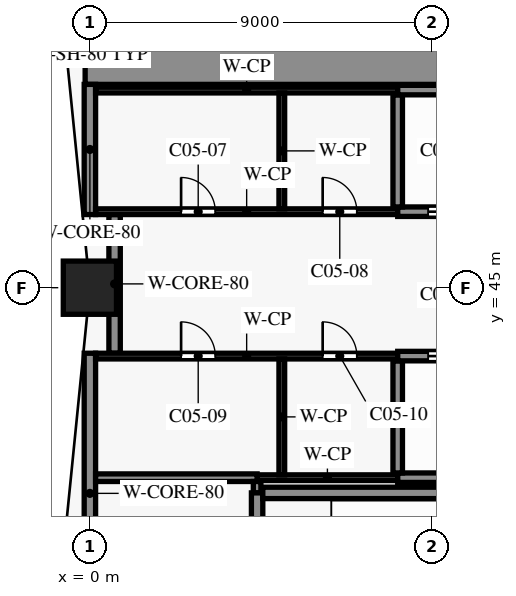
"""IFC4 building model, lengths in metres.
Left out: names, types, materials, properties, quantities, classifications, styles, units other than length and angle.
Written with IfcOpenShell. Run it as: python <this file> out.ifc"""

import sys

from ifc_helpers import new_model, si_unit, direction, frame, frame_2d, origin, origin_2d, place, context, subcontext, project, spatial, rectangle, extrude, element, fill, save


model = new_model("IFC4")
c1 = context("Model", 3, precision=1e-05, world=origin(), true_north=direction((0.0, 1.0)))
c2 = subcontext(c1, "Body", "Model", "MODEL_VIEW")
j1 = project(units=[si_unit("LENGTHUNIT", "METRE"), si_unit("PLANEANGLEUNIT", "RADIAN")], contexts=[c1])
p1 = place(None, origin())
s1 = spatial("IfcSite", under=j1, at=p1, CompositionType="ELEMENT")
p2 = place(p1, origin())
s2 = spatial("IfcBuilding", under=s1, at=p2, CompositionType="ELEMENT")
p3 = place(p2, frame((0.0, 0.0, 19.5)))
s3 = spatial("IfcBuildingStorey", under=s2, at=p3, CompositionType="ELEMENT", Elevation=19.5)
p4 = place(p3, frame((0.0, 45.0, 0.0), z_axis=(0.0, 0.0, 1.0), x_axis=(1.0, 0.0, 0.0)))
e1 = element("IfcColumn", 1, at=p4, inside=s3, PredefinedType="COLUMN", context=c2, shape_type="SweptSolid", body=[
    extrude(rectangle(XDim=1.4, YDim=1.4, at=origin_2d()), origin(), (0.0, 0.0, 1.0), 8.0),
])
p5 = place(p3, frame((4.55, 39.6, 0.0), z_axis=(0.0, 0.0, 1.0), x_axis=(1.0, 0.0, 0.0)))
e2 = element("IfcWall", 2, at=p5, inside=s3, PredefinedType="SHEAR", context=c2, shape_type="SweptSolid", body=[
    extrude(rectangle(XDim=7.7, YDim=0.3, at=frame_2d((3.85, 0.0))), origin(), (0.0, 0.0, 1.0), 7.7),
])
p6 = place(p3, frame((4.4, 40.0, 0.0), z_axis=(0.0, 0.0, 1.0), x_axis=(1.0, 0.0, 0.0)))
e3 = element("IfcWall", 3, at=p6, inside=s3, PredefinedType="PARTITIONING", context=c2, shape_type="SweptSolid", body=[
    extrude(rectangle(XDim=3.7, YDim=0.15, at=frame_2d((1.85, 0.0))), origin(), (0.0, 0.0, 1.0), 7.7),
])
p7 = place(p3, frame((0.15, 40.0, 0.0), z_axis=(0.0, 0.0, 1.0), x_axis=(1.0, 0.0, 0.0)))
e4 = element("IfcWall", 4, at=p7, inside=s3, PredefinedType="PARTITIONING", context=c2, shape_type="SweptSolid", body=[
    extrude(rectangle(XDim=4.25, YDim=0.2, at=frame_2d((2.125, 0.0))), origin(), (0.0, 0.0, 1.0), 7.7),
])
p8 = place(p3, frame((8.1, 40.0, 0.0), z_axis=(0.0, 0.0, 1.0), x_axis=(1.0, 0.0, 0.0)))
e5 = element("IfcWall", 5, at=p8, inside=s3, PredefinedType="SHEAR", context=c2, shape_type="SweptSolid", body=[
    extrude(rectangle(XDim=16.075, YDim=0.25, at=frame_2d((8.038, 0.0))), origin(), (0.0, 0.0, 1.0), 7.7),
])
p9 = place(p3, frame((0.15, 43.2, 0.0), z_axis=(0.0, 0.0, 1.0), x_axis=(1.0, 0.0, 0.0)))
e6 = element("IfcWall", 6, at=p9, inside=s3, PredefinedType="PARTITIONING", context=c2, shape_type="SweptSolid", body=[
    extrude(rectangle(XDim=7.95, YDim=0.15, at=frame_2d((3.975, 0.0))), origin(), (0.0, 0.0, 1.0), 7.7),
])
p10 = place(p9, frame((2.25, 0.0, 0.0)))
e7 = element("IfcOpeningElement", 7, at=p10, cuts=e6, PredefinedType="OPENING", context=c2, shape_type="SweptSolid", body=[
    extrude(rectangle(XDim=0.9, YDim=2.1, at=frame_2d((0.45, 1.05))), frame((0.0, 0.085, 0.0), z_axis=(0.0, -1.0, 0.0), x_axis=(1.0, 0.0, 0.0)), (0.0, 0.0, 1.0), 0.17),
])
p11 = place(p9, frame((5.975, 0.0, 0.0)))
e8 = element("IfcOpeningElement", 8, at=p11, cuts=e6, PredefinedType="OPENING", context=c2, shape_type="SweptSolid", body=[
    extrude(rectangle(XDim=0.9, YDim=2.1, at=frame_2d((0.45, 1.05))), frame((0.0, 0.085, 0.0), z_axis=(0.0, -1.0, 0.0), x_axis=(1.0, 0.0, 0.0)), (0.0, 0.0, 1.0), 0.17),
])
p12 = place(p3, frame((8.1, 43.2, 0.0), z_axis=(0.0, 0.0, 1.0), x_axis=(1.0, 0.0, 0.0)))
e9 = element("IfcWall", 9, at=p12, inside=s3, PredefinedType="SHEAR", context=c2, shape_type="SweptSolid", body=[
    extrude(rectangle(XDim=16.075, YDim=0.25, at=frame_2d((8.038, 0.0))), origin(), (0.0, 0.0, 1.0), 7.7),
])
p13 = place(p12, frame((14.3, 0.0, 0.0)))
e10 = element("IfcOpeningElement", 10, at=p13, cuts=e9, PredefinedType="OPENING", context=c2, shape_type="SweptSolid", body=[
    extrude(rectangle(XDim=1.1, YDim=2.1, at=frame_2d((0.55, 1.05))), frame((0.0, 0.135, 0.0), z_axis=(0.0, -1.0, 0.0), x_axis=(1.0, 0.0, 0.0)), (0.0, 0.0, 1.0), 0.27),
])
p14 = place(p12, frame((0.8, 0.0, 0.0)))
e11 = element("IfcOpeningElement", 11, at=p14, cuts=e9, PredefinedType="OPENING", context=c2, shape_type="SweptSolid", body=[
    extrude(rectangle(XDim=1.1, YDim=2.1, at=frame_2d((0.55, 1.05))), frame((0.0, 0.135, 0.0), z_axis=(0.0, -1.0, 0.0), x_axis=(1.0, 0.0, 0.0)), (0.0, 0.0, 1.0), 0.27),
])
p15 = place(p12, frame((3.5, 0.0, 0.0)))
e12 = element("IfcOpeningElement", 12, at=p15, cuts=e9, PredefinedType="OPENING", context=c2, shape_type="SweptSolid", body=[
    extrude(rectangle(XDim=1.1, YDim=2.1, at=frame_2d((0.55, 1.05))), frame((0.0, 0.135, 0.0), z_axis=(0.0, -1.0, 0.0), x_axis=(1.0, 0.0, 0.0)), (0.0, 0.0, 1.0), 0.27),
])
p16 = place(p12, frame((6.2, 0.0, 0.0)))
e13 = element("IfcOpeningElement", 13, at=p16, cuts=e9, PredefinedType="OPENING", context=c2, shape_type="SweptSolid", body=[
    extrude(rectangle(XDim=1.1, YDim=2.1, at=frame_2d((0.55, 1.05))), frame((0.0, 0.135, 0.0), z_axis=(0.0, -1.0, 0.0), x_axis=(1.0, 0.0, 0.0)), (0.0, 0.0, 1.0), 0.27),
])
p17 = place(p12, frame((8.9, 0.0, 0.0)))
e14 = element("IfcOpeningElement", 14, at=p17, cuts=e9, PredefinedType="OPENING", context=c2, shape_type="SweptSolid", body=[
    extrude(rectangle(XDim=1.1, YDim=2.1, at=frame_2d((0.55, 1.05))), frame((0.0, 0.135, 0.0), z_axis=(0.0, -1.0, 0.0), x_axis=(1.0, 0.0, 0.0)), (0.0, 0.0, 1.0), 0.27),
])
p18 = place(p12, frame((11.6, 0.0, 0.0)))
e15 = element("IfcOpeningElement", 15, at=p18, cuts=e9, PredefinedType="OPENING", context=c2, shape_type="SweptSolid", body=[
    extrude(rectangle(XDim=1.1, YDim=2.1, at=frame_2d((0.55, 1.05))), frame((0.0, 0.135, 0.0), z_axis=(0.0, -1.0, 0.0), x_axis=(1.0, 0.0, 0.0)), (0.0, 0.0, 1.0), 0.27),
])
p19 = place(p3, frame((0.15, 47.0, 0.0), z_axis=(0.0, 0.0, 1.0), x_axis=(1.0, 0.0, 0.0)))
e16 = element("IfcWall", 16, at=p19, inside=s3, PredefinedType="PARTITIONING", context=c2, shape_type="SweptSolid", body=[
    extrude(rectangle(XDim=7.95, YDim=0.15, at=frame_2d((3.975, 0.0))), origin(), (0.0, 0.0, 1.0), 7.7),
])
p20 = place(p19, frame((2.25, 0.0, 0.0)))
e17 = element("IfcOpeningElement", 17, at=p20, cuts=e16, PredefinedType="OPENING", context=c2, shape_type="SweptSolid", body=[
    extrude(rectangle(XDim=0.9, YDim=2.1, at=frame_2d((0.45, 1.05))), frame((0.0, 0.085, 0.0), z_axis=(0.0, -1.0, 0.0), x_axis=(1.0, 0.0, 0.0)), (0.0, 0.0, 1.0), 0.17),
])
p21 = place(p19, frame((5.975, 0.0, 0.0)))
e18 = element("IfcOpeningElement", 18, at=p21, cuts=e16, PredefinedType="OPENING", context=c2, shape_type="SweptSolid", body=[
    extrude(rectangle(XDim=0.9, YDim=2.1, at=frame_2d((0.45, 1.05))), frame((0.0, 0.085, 0.0), z_axis=(0.0, -1.0, 0.0), x_axis=(1.0, 0.0, 0.0)), (0.0, 0.0, 1.0), 0.17),
])
p22 = place(p3, frame((8.1, 47.0, 0.0), z_axis=(0.0, 0.0, 1.0), x_axis=(1.0, 0.0, 0.0)))
e19 = element("IfcWall", 19, at=p22, inside=s3, PredefinedType="SHEAR", context=c2, shape_type="SweptSolid", body=[
    extrude(rectangle(XDim=13.5, YDim=0.25, at=frame_2d((6.75, 0.0))), origin(), (0.0, 0.0, 1.0), 7.7),
])
p23 = place(p22, frame((0.8, 0.0, 0.0)))
e20 = element("IfcOpeningElement", 20, at=p23, cuts=e19, PredefinedType="OPENING", context=c2, shape_type="SweptSolid", body=[
    extrude(rectangle(XDim=1.1, YDim=2.1, at=frame_2d((0.55, 1.05))), frame((0.0, 0.135, 0.0), z_axis=(0.0, -1.0, 0.0), x_axis=(1.0, 0.0, 0.0)), (0.0, 0.0, 1.0), 0.27),
])
p24 = place(p22, frame((3.5, 0.0, 0.0)))
e21 = element("IfcOpeningElement", 21, at=p24, cuts=e19, PredefinedType="OPENING", context=c2, shape_type="SweptSolid", body=[
    extrude(rectangle(XDim=1.1, YDim=2.1, at=frame_2d((0.55, 1.05))), frame((0.0, 0.135, 0.0), z_axis=(0.0, -1.0, 0.0), x_axis=(1.0, 0.0, 0.0)), (0.0, 0.0, 1.0), 0.27),
])
p25 = place(p22, frame((6.2, 0.0, 0.0)))
e22 = element("IfcOpeningElement", 22, at=p25, cuts=e19, PredefinedType="OPENING", context=c2, shape_type="SweptSolid", body=[
    extrude(rectangle(XDim=1.1, YDim=2.1, at=frame_2d((0.55, 1.05))), frame((0.0, 0.135, 0.0), z_axis=(0.0, -1.0, 0.0), x_axis=(1.0, 0.0, 0.0)), (0.0, 0.0, 1.0), 0.27),
])
p26 = place(p22, frame((8.9, 0.0, 0.0)))
e23 = element("IfcOpeningElement", 23, at=p26, cuts=e19, PredefinedType="OPENING", context=c2, shape_type="SweptSolid", body=[
    extrude(rectangle(XDim=1.1, YDim=2.1, at=frame_2d((0.55, 1.05))), frame((0.0, 0.135, 0.0), z_axis=(0.0, -1.0, 0.0), x_axis=(1.0, 0.0, 0.0)), (0.0, 0.0, 1.0), 0.27),
])
p27 = place(p22, frame((11.6, 0.0, 0.0)))
e24 = element("IfcOpeningElement", 24, at=p27, cuts=e19, PredefinedType="OPENING", context=c2, shape_type="SweptSolid", body=[
    extrude(rectangle(XDim=1.1, YDim=2.1, at=frame_2d((0.55, 1.05))), frame((0.0, 0.135, 0.0), z_axis=(0.0, -1.0, 0.0), x_axis=(1.0, 0.0, 0.0)), (0.0, 0.0, 1.0), 0.27),
])
p28 = place(p3, frame((0.15, 50.2, 0.0), z_axis=(0.0, 0.0, 1.0), x_axis=(1.0, 0.0, 0.0)))
e25 = element("IfcWall", 25, at=p28, inside=s3, PredefinedType="PARTITIONING", context=c2, shape_type="SweptSolid", body=[
    extrude(rectangle(XDim=7.95, YDim=0.15, at=frame_2d((3.975, 0.0))), origin(), (0.0, 0.0, 1.0), 7.7),
])
p29 = place(p3, frame((8.1, 50.2, 0.0), z_axis=(0.0, 0.0, 1.0), x_axis=(1.0, 0.0, 0.0)))
e26 = element("IfcWall", 26, at=p29, inside=s3, PredefinedType="SHEAR", context=c2, shape_type="SweptSolid", body=[
    extrude(rectangle(XDim=13.375, YDim=0.25, at=frame_2d((6.688, 0.0))), origin(), (0.0, 0.0, 1.0), 7.7),
])
p30 = place(p3, frame((-0.125, 51.0, 0.0), z_axis=(0.0, 0.0, 1.0), x_axis=(1.0, 0.0, 0.0)))
e27 = element("IfcWall", 27, at=p30, inside=s3, PredefinedType="SHEAR", context=c2, shape_type="SweptSolid", body=[
    extrude(rectangle(XDim=21.625, YDim=1.3, at=frame_2d((10.812, 0.0))), origin(), (0.0, 0.0, 1.0), 7.7),
])
p31 = place(p3, frame((0.0, 35.9, 0.0), z_axis=(0.0, 0.0, 1.0), x_axis=(0.0, 1.0, 0.0)))
e28 = element("IfcWall", 28, at=p31, inside=s3, PredefinedType="SHEAR", context=c2, shape_type="SweptSolid", body=[
    extrude(rectangle(XDim=7.375, YDim=0.3, at=frame_2d((3.688, 0.0))), origin(), (0.0, 0.0, 1.0), 7.7),
])
p32 = place(p3, frame((0.0, 46.925, 0.0), z_axis=(0.0, 0.0, 1.0), x_axis=(0.0, 1.0, 0.0)))
e29 = element("IfcWall", 29, at=p32, inside=s3, PredefinedType="SHEAR", context=c2, shape_type="SweptSolid", body=[
    extrude(rectangle(XDim=3.425, YDim=0.3, at=frame_2d((1.712, 0.0))), origin(), (0.0, 0.0, 1.0), 7.7),
])
p33 = place(p3, frame((0.65, 43.275, 0.0), z_axis=(0.0, 0.0, 1.0), x_axis=(0.0, 1.0, 0.0)))
e30 = element("IfcWall", 30, at=p33, inside=s3, PredefinedType="SHEAR", context=c2, shape_type="SweptSolid", body=[
    extrude(rectangle(XDim=3.65, YDim=0.3, at=frame_2d((1.825, 0.0))), origin(), (0.0, 0.0, 1.0), 7.7),
])
p34 = place(p3, frame((4.4, 39.6, 0.0), z_axis=(0.0, 0.0, 1.0), x_axis=(0.0, 1.0, 0.0)))
e31 = element("IfcWall", 31, at=p34, inside=s3, PredefinedType="PARTITIONING", context=c2, shape_type="SweptSolid", body=[
    extrude(rectangle(XDim=0.3, YDim=0.2, at=frame_2d((0.15, 0.0))), origin(), (0.0, 0.0, 1.0), 7.7),
])
p35 = place(p3, frame((4.4, 36.15, 0.0), z_axis=(0.0, 0.0, 1.0), x_axis=(0.0, 1.0, 0.0)))
e32 = element("IfcWall", 32, at=p35, inside=s3, PredefinedType="SHEAR", context=c2, shape_type="SweptSolid", body=[
    extrude(rectangle(XDim=3.45, YDim=0.3, at=frame_2d((1.725, 0.0))), origin(), (0.0, 0.0, 1.0), 7.7),
])
for number, where, z_axis, x_axis in (
    (33, (5.05, 40.075, 0.0), (0.0, 0.0, 1.0), (0.0, 1.0, 0.0)),
    (34, (5.05, 47.075, 0.0), (0.0, 0.0, 1.0), (0.0, 1.0, 0.0)),
):
    element("IfcWall", number, at=place(p3, frame(where, z_axis=z_axis, x_axis=x_axis)), inside=s3, PredefinedType="PARTITIONING", context=c2, shape_type="SweptSolid", body=[
        extrude(rectangle(XDim=3.05, YDim=0.15, at=frame_2d((1.525, 0.0))), origin(), (0.0, 0.0, 1.0), 7.7),
    ])
for number, where, z_axis, x_axis in (
    (35, (8.1, 40.125, 0.0), (0.0, 0.0, 1.0), (0.0, 1.0, 0.0)),
    (36, (8.1, 47.125, 0.0), (0.0, 0.0, 1.0), (0.0, 1.0, 0.0)),
):
    element("IfcWall", number, at=place(p3, frame(where, z_axis=z_axis, x_axis=x_axis)), inside=s3, PredefinedType="SHEAR", context=c2, shape_type="SweptSolid", body=[
        extrude(rectangle(XDim=2.95, YDim=0.25, at=frame_2d((1.475, 0.0))), origin(), (0.0, 0.0, 1.0), 7.7),
    ])
p36 = place(p20, origin())
e37 = element("IfcDoor", 37, at=p36, inside=s3, OperationType="SINGLE_SWING_RIGHT", PredefinedType="DOOR", context=c2, shape_type="SweptSolid", body=[
    extrude(rectangle(XDim=0.9, YDim=2.1, at=frame_2d((0.45, 1.05))), frame((0.0, 0.025, 0.0), z_axis=(0.0, -1.0, 0.0), x_axis=(1.0, 0.0, 0.0)), (0.0, 0.0, 1.0), 0.05),
])
fill(e17, e37)
p37 = place(p21, origin())
e38 = element("IfcDoor", 38, at=p37, inside=s3, OperationType="SINGLE_SWING_LEFT", PredefinedType="DOOR", context=c2, shape_type="SweptSolid", body=[
    extrude(rectangle(XDim=0.9, YDim=2.1, at=frame_2d((0.45, 1.05))), frame((0.0, 0.025, 0.0), z_axis=(0.0, -1.0, 0.0), x_axis=(1.0, 0.0, 0.0)), (0.0, 0.0, 1.0), 0.05),
])
fill(e18, e38)
p38 = place(p10, origin())
e39 = element("IfcDoor", 39, at=p38, inside=s3, OperationType="SINGLE_SWING_LEFT", PredefinedType="DOOR", context=c2, shape_type="SweptSolid", body=[
    extrude(rectangle(XDim=0.9, YDim=2.1, at=frame_2d((0.45, 1.05))), frame((0.0, 0.025, 0.0), z_axis=(0.0, -1.0, 0.0), x_axis=(1.0, 0.0, 0.0)), (0.0, 0.0, 1.0), 0.05),
])
fill(e7, e39)
p39 = place(p11, origin())
e40 = element("IfcDoor", 40, at=p39, inside=s3, OperationType="SINGLE_SWING_RIGHT", PredefinedType="DOOR", context=c2, shape_type="SweptSolid", body=[
    extrude(rectangle(XDim=0.9, YDim=2.1, at=frame_2d((0.45, 1.05))), frame((0.0, 0.025, 0.0), z_axis=(0.0, -1.0, 0.0), x_axis=(1.0, 0.0, 0.0)), (0.0, 0.0, 1.0), 0.05),
])
fill(e8, e40)
p40 = place(p14, origin())
e41 = element("IfcDoor", 41, at=p40, inside=s3, OperationType="DOUBLE_DOOR_SLIDING", PredefinedType="DOOR", context=c2, shape_type="SweptSolid", body=[
    extrude(rectangle(XDim=1.1, YDim=2.1, at=frame_2d((0.55, 1.05))), frame((0.0, 0.025, 0.0), z_axis=(0.0, -1.0, 0.0), x_axis=(1.0, 0.0, 0.0)), (0.0, 0.0, 1.0), 0.05),
])
fill(e11, e41)
p41 = place(p23, origin())
e42 = element("IfcDoor", 42, at=p41, inside=s3, OperationType="DOUBLE_DOOR_SLIDING", PredefinedType="DOOR", context=c2, shape_type="SweptSolid", body=[
    extrude(rectangle(XDim=1.1, YDim=2.1, at=frame_2d((0.55, 1.05))), frame((0.0, 0.025, 0.0), z_axis=(0.0, -1.0, 0.0), x_axis=(1.0, 0.0, 0.0)), (0.0, 0.0, 1.0), 0.05),
])
fill(e20, e42)
save(model, sys.argv[1])
